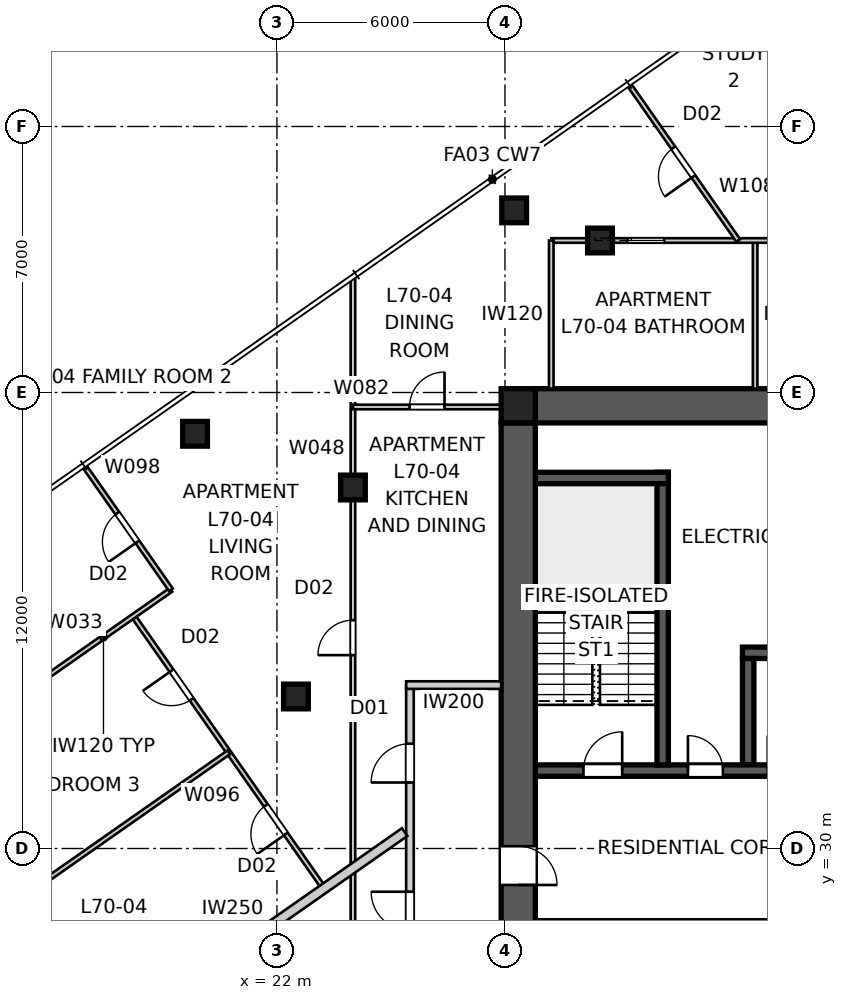
"""IFC4 building model, lengths in metres.
Left out: names, types, materials, properties, quantities, classifications, styles, units other than length and angle.
Written with IfcOpenShell. Run it as: python <this file> out.ifc"""

import sys

from ifc_helpers import new_model, si_unit, direction, frame, frame_2d, origin, origin_2d, place, context, subcontext, project, spatial, polyline, rectangle, outline, extrude, element, fill, save


model = new_model("IFC4")
c1 = context("Model", 3, precision=1e-05, world=origin(), true_north=direction((0.0, 1.0)))
c2 = subcontext(c1, "Body", "Model", "MODEL_VIEW")
j1 = project(units=[si_unit("LENGTHUNIT", "METRE"), si_unit("PLANEANGLEUNIT", "RADIAN")], contexts=[c1])
p1 = place(None, origin())
s1 = spatial("IfcSite", under=j1, at=p1, CompositionType="ELEMENT")
p2 = place(p1, origin())
s2 = spatial("IfcBuilding", under=s1, at=p2, CompositionType="ELEMENT")
p3 = place(p2, frame((0.0, 0.0, 254.0)))
s3 = spatial("IfcBuildingStorey", under=s2, at=p3, CompositionType="ELEMENT", Elevation=254.0)
p4 = place(p3, frame((28.8, 41.65, 0.0), z_axis=(0.0, 0.0, 1.0), x_axis=(1.0, 0.0, 0.0)))
e1 = element("IfcWall", 1, at=p4, inside=s3, PredefinedType="SHEAR", context=c2, shape_type="SweptSolid", body=[
    extrude(outline(polyline([(0.0, -0.45), (22.4, -0.45), (22.4, -0.025), (22.85, -0.025), (22.85, 0.025), (22.4, 0.025), (22.4, 0.45), (0.0, 0.45), (0.0, 0.025), (-0.45, 0.025), (-0.45, -0.025), (0.0, -0.025), (0.0, -0.45)])), origin(), (0.0, 0.0, 1.0), 3.4),
])
p5 = place(p3, frame((28.35, 41.2, 0.0), z_axis=(0.0, 0.0, 1.0), x_axis=(0.0, -1.0, 0.0)))
e2 = element("IfcWall", 2, at=p5, inside=s3, PredefinedType="SHEAR", context=c2, shape_type="SweptSolid", body=[
    extrude(outline(polyline([(0.0, -0.45), (22.4, -0.45), (22.4, -0.025), (22.85, -0.025), (22.85, 0.025), (22.4, 0.025), (22.4, 0.45), (0.0, 0.45), (0.0, 0.025), (-0.45, 0.025), (-0.45, -0.025), (0.0, -0.025), (0.0, -0.45)])), origin(), (0.0, 0.0, 1.0), 3.4),
])
p6 = place(p5, frame((11.14, 0.0, 0.0)))
e3 = element("IfcOpeningElement", 3, at=p6, cuts=e2, PredefinedType="OPENING", context=c2, shape_type="SweptSolid", body=[
    extrude(rectangle(XDim=1.02, YDim=2.4, at=frame_2d((0.51, 1.2))), frame((0.0, 0.46, 0.0), z_axis=(0.0, -1.0, 0.0), x_axis=(1.0, 0.0, 0.0)), (0.0, 0.0, 1.0), 0.92),
])
p7 = place(p3, frame((28.8, 32.05, 0.0), z_axis=(0.0, 0.0, 1.0), x_axis=(1.0, 0.0, 0.0)))
e4 = element("IfcWall", 4, at=p7, inside=s3, PredefinedType="SHEAR", context=c2, shape_type="SweptSolid", body=[
    extrude(rectangle(XDim=22.4, YDim=0.3, at=frame_2d((11.2, 0.0))), origin(), (0.0, 0.0, 1.0), 3.4),
])
p8 = place(p7, frame((19.04, 0.0, 0.0)))
e5 = element("IfcOpeningElement", 5, at=p8, cuts=e4, PredefinedType="OPENING", context=c2, shape_type="SweptSolid", body=[
    extrude(rectangle(XDim=0.92, YDim=2.1, at=frame_2d((0.46, 1.05))), frame((0.0, 0.16, 0.0), z_axis=(0.0, -1.0, 0.0), x_axis=(1.0, 0.0, 0.0)), (0.0, 0.0, 1.0), 0.32),
])
p9 = place(p7, frame((1.265, 0.0, 0.0)))
e6 = element("IfcOpeningElement", 6, at=p9, cuts=e4, PredefinedType="OPENING", context=c2, shape_type="SweptSolid", body=[
    extrude(rectangle(XDim=1.02, YDim=2.1, at=frame_2d((0.51, 1.05))), frame((0.0, 0.16, 0.0), z_axis=(0.0, -1.0, 0.0), x_axis=(1.0, 0.0, 0.0)), (0.0, 0.0, 1.0), 0.32),
])
p10 = place(p7, frame((4.015, 0.0, 0.0)))
e7 = element("IfcOpeningElement", 7, at=p10, cuts=e4, PredefinedType="OPENING", context=c2, shape_type="SweptSolid", body=[
    extrude(rectangle(XDim=0.92, YDim=2.1, at=frame_2d((0.46, 1.05))), frame((0.0, 0.16, 0.0), z_axis=(0.0, -1.0, 0.0), x_axis=(1.0, 0.0, 0.0)), (0.0, 0.0, 1.0), 0.32),
])
p11 = place(p7, frame((6.115, 0.0, 0.0)))
e8 = element("IfcOpeningElement", 8, at=p11, cuts=e4, PredefinedType="OPENING", context=c2, shape_type="SweptSolid", body=[
    extrude(rectangle(XDim=0.92, YDim=2.1, at=frame_2d((0.46, 1.05))), frame((0.0, 0.16, 0.0), z_axis=(0.0, -1.0, 0.0), x_axis=(1.0, 0.0, 0.0)), (0.0, 0.0, 1.0), 0.32),
])
p12 = place(p7, frame((9.79, 0.0, 0.0)))
e9 = element("IfcOpeningElement", 9, at=p12, cuts=e4, PredefinedType="OPENING", context=c2, shape_type="SweptSolid", body=[
    extrude(rectangle(XDim=0.92, YDim=2.1, at=frame_2d((0.46, 1.05))), frame((0.0, 0.16, 0.0), z_axis=(0.0, -1.0, 0.0), x_axis=(1.0, 0.0, 0.0)), (0.0, 0.0, 1.0), 0.32),
])
p13 = place(p7, frame((12.05, 0.0, 0.0)))
e10 = element("IfcOpeningElement", 10, at=p13, cuts=e4, PredefinedType="OPENING", context=c2, shape_type="SweptSolid", body=[
    extrude(rectangle(XDim=1.1, YDim=2.1, at=frame_2d((0.55, 1.05))), frame((0.0, 0.16, 0.0), z_axis=(0.0, -1.0, 0.0), x_axis=(1.0, 0.0, 0.0)), (0.0, 0.0, 1.0), 0.32),
])
p14 = place(p7, frame((14.85, 0.0, 0.0)))
e11 = element("IfcOpeningElement", 11, at=p14, cuts=e4, PredefinedType="OPENING", context=c2, shape_type="SweptSolid", body=[
    extrude(rectangle(XDim=1.1, YDim=2.1, at=frame_2d((0.55, 1.05))), frame((0.0, 0.16, 0.0), z_axis=(0.0, -1.0, 0.0), x_axis=(1.0, 0.0, 0.0)), (0.0, 0.0, 1.0), 0.32),
])
p15 = place(p3, frame((34.25, 35.15, 0.0), z_axis=(0.0, 0.0, 1.0), x_axis=(1.0, 0.0, 0.0)))
e12 = element("IfcWall", 12, at=p15, inside=s3, PredefinedType="SHEAR", context=c2, shape_type="SweptSolid", body=[
    extrude(rectangle(XDim=11.5, YDim=0.3, at=frame_2d((5.75, 0.0))), origin(), (0.0, 0.0, 1.0), 3.4),
])
p16 = place(p3, frame((34.4, 32.2, 0.0), z_axis=(0.0, 0.0, 1.0), x_axis=(0.0, 1.0, 0.0)))
e13 = element("IfcWall", 13, at=p16, inside=s3, PredefinedType="SHEAR", context=c2, shape_type="SweptSolid", body=[
    extrude(rectangle(XDim=2.8, YDim=0.3, at=frame_2d((1.4, 0.0))), origin(), (0.0, 0.0, 1.0), 3.4),
])
p17 = place(p3, frame((32.15, 32.2, 0.0), z_axis=(0.0, 0.0, 1.0), x_axis=(0.0, 1.0, 0.0)))
e14 = element("IfcWall", 14, at=p17, inside=s3, PredefinedType="SHEAR", context=c2, shape_type="SweptSolid", body=[
    extrude(rectangle(XDim=7.7, YDim=0.3, at=frame_2d((3.85, 0.0))), origin(), (0.0, 0.0, 1.0), 3.4),
])
p18 = place(p3, frame((28.8, 39.75, 0.0), z_axis=(0.0, 0.0, 1.0), x_axis=(1.0, 0.0, 0.0)))
e15 = element("IfcWall", 15, at=p18, inside=s3, PredefinedType="SHEAR", context=c2, shape_type="SweptSolid", body=[
    extrude(rectangle(XDim=3.5, YDim=0.3, at=frame_2d((1.75, 0.0))), origin(), (0.0, 0.0, 1.0), 3.4),
])
p19 = place(p3, frame((28.35, 41.65, 0.0), z_axis=(0.0, 0.0, 1.0), x_axis=(1.0, 0.0, 0.0)))
e16 = element("IfcColumn", 16, at=p19, inside=s3, PredefinedType="COLUMN", context=c2, shape_type="SweptSolid", body=[
    extrude(rectangle(XDim=0.9, YDim=0.9, at=origin_2d()), origin(), (0.0, 0.0, 1.0), 3.4),
])
for number, where, z_axis, x_axis in (
    (17, (28.242, 46.793, 0.0), (0.0, 0.0, 1.0), (1.0, 0.0, 0.0)),
    (18, (19.845, 40.914, 0.0), (0.0, 0.0, 1.0), (1.0, 0.0, 0.0)),
    (19, (30.5, 46.0, 0.0), (0.0, 0.0, 1.0), (1.0, 0.0, 0.0)),
    (20, (24.0, 39.5, 0.0), (0.0, 0.0, 1.0), (1.0, 0.0, 0.0)),
    (21, (22.5, 34.0, 0.0), (0.0, 0.0, 1.0), (1.0, 0.0, 0.0)),
):
    element("IfcColumn", number, at=place(p3, frame(where, z_axis=z_axis, x_axis=x_axis)), inside=s3, PredefinedType="COLUMN", context=c2, shape_type="SweptSolid", body=[
        extrude(rectangle(XDim=0.65, YDim=0.65, at=origin_2d()), origin(), (0.0, 0.0, 1.0), 3.4),
    ])
p20 = place(p3, frame((25.5, 25.7, 0.0), z_axis=(0.0, 0.0, 1.0), x_axis=(0.0, 1.0, 0.0)))
e22 = element("IfcWall", 22, at=p20, inside=s3, PredefinedType="PARTITIONING", context=c2, shape_type="SweptSolid", body=[
    extrude(rectangle(XDim=8.6, YDim=0.2, at=frame_2d((4.3, 0.0))), origin(), (0.0, 0.0, 1.0), 3.25),
])
p21 = place(p20, frame((2.142, 0.0, 0.0)))
e23 = element("IfcOpeningElement", 23, at=p21, cuts=e22, PredefinedType="OPENING", context=c2, shape_type="SweptSolid", body=[
    extrude(rectangle(XDim=1.02, YDim=2.34, at=frame_2d((0.51, 1.17))), frame((0.0, 0.11, 0.0), z_axis=(0.0, -1.0, 0.0), x_axis=(1.0, 0.0, 0.0)), (0.0, 0.0, 1.0), 0.22),
])
p22 = place(p20, frame((6.037, 0.0, 0.0)))
e24 = element("IfcOpeningElement", 24, at=p22, cuts=e22, PredefinedType="OPENING", context=c2, shape_type="SweptSolid", body=[
    extrude(rectangle(XDim=1.02, YDim=2.34, at=frame_2d((0.51, 1.17))), frame((0.0, 0.11, 0.0), z_axis=(0.0, -1.0, 0.0), x_axis=(1.0, 0.0, 0.0)), (0.0, 0.0, 1.0), 0.22),
])
p23 = place(p3, frame((27.9, 34.3, 0.0), z_axis=(0.0, 0.0, 1.0), x_axis=(-1.0, 0.0, 0.0)))
e25 = element("IfcWall", 25, at=p23, inside=s3, PredefinedType="PARTITIONING", context=c2, shape_type="SweptSolid", body=[
    extrude(rectangle(XDim=2.5, YDim=0.2, at=frame_2d((1.25, 0.0))), origin(), (0.0, 0.0, 1.0), 3.25),
])
p24 = place(p3, frame((17.369, 24.836, 0.0), z_axis=(0.0, 0.0, 1.0), x_axis=(0.81915902312, 0.573566469418, 0.0)))
e26 = element("IfcWall", 26, at=p24, inside=s3, PredefinedType="PARTITIONING", context=c2, shape_type="SweptSolid", body=[
    extrude(rectangle(XDim=9.756, YDim=0.25, at=frame_2d((4.878, 0.0))), origin(), (0.0, 0.0, 1.0), 3.25),
])
p25 = place(p3, frame((24.0, 18.797, 0.0), z_axis=(0.0, 0.0, 1.0), x_axis=(0.0, 1.0, 0.0)))
e27 = element("IfcWall", 27, at=p25, inside=s3, PredefinedType="PARTITIONING", context=c2, shape_type="SweptSolid", body=[
    extrude(rectangle(XDim=26.198, YDim=0.12, at=frame_2d((13.099, 0.0))), origin(), (0.0, 0.0, 1.0), 2.549),
])
p26 = place(p25, frame((8.016, 0.0, 0.0)))
e28 = element("IfcOpeningElement", 28, at=p26, cuts=e27, PredefinedType="OPENING", context=c2, shape_type="SweptSolid", body=[
    extrude(rectangle(XDim=0.92, YDim=2.34, at=frame_2d((0.46, 1.17))), frame((0.0, 0.07, 0.0), z_axis=(0.0, -1.0, 0.0), x_axis=(1.0, 0.0, 0.0)), (0.0, 0.0, 1.0), 0.14),
])
p27 = place(p25, frame((16.292, 0.0, 0.0)))
e29 = element("IfcOpeningElement", 29, at=p27, cuts=e27, PredefinedType="OPENING", context=c2, shape_type="SweptSolid", body=[
    extrude(rectangle(XDim=0.92, YDim=2.34, at=frame_2d((0.46, 1.17))), frame((0.0, 0.07, 0.0), z_axis=(0.0, -1.0, 0.0), x_axis=(1.0, 0.0, 0.0)), (0.0, 0.0, 1.0), 0.14),
])
p28 = place(p3, frame((24.0, 41.619, 0.0), z_axis=(0.0, 0.0, 1.0), x_axis=(1.0, 0.0, 0.0)))
e30 = element("IfcWall", 30, at=p28, inside=s3, PredefinedType="PARTITIONING", context=c2, shape_type="SweptSolid", body=[
    extrude(rectangle(XDim=3.9, YDim=0.12, at=frame_2d((1.95, 0.0))), origin(), (0.0, 0.0, 1.0), 3.25),
])
p29 = place(p28, frame((1.49, 0.0, 0.0)))
e31 = element("IfcOpeningElement", 31, at=p29, cuts=e30, PredefinedType="OPENING", context=c2, shape_type="SweptSolid", body=[
    extrude(rectangle(XDim=0.92, YDim=2.1, at=frame_2d((0.46, 1.05))), frame((0.0, 0.07, 0.0), z_axis=(0.0, -1.0, 0.0), x_axis=(1.0, 0.0, 0.0)), (0.0, 0.0, 1.0), 0.14),
])
p30 = place(p3, frame((34.583, 46.0, 0.0), z_axis=(0.0, 0.0, 1.0), x_axis=(0.0, -1.0, 0.0)))
e32 = element("IfcWall", 32, at=p30, inside=s3, PredefinedType="PARTITIONING", context=c2, shape_type="SweptSolid", body=[
    extrude(rectangle(XDim=3.9, YDim=0.12, at=frame_2d((1.95, 0.0))), origin(), (0.0, 0.0, 1.0), 3.25),
])
p31 = place(p3, frame((29.219, 46.0, 0.0), z_axis=(0.0, 0.0, 1.0), x_axis=(1.0, 0.0, 0.0)))
e33 = element("IfcWall", 33, at=p31, inside=s3, PredefinedType="PARTITIONING", context=c2, shape_type="SweptSolid", body=[
    extrude(rectangle(XDim=11.034, YDim=0.12, at=frame_2d((5.517, 0.0))), origin(), (0.0, 0.0, 1.0), 2.549),
])
p32 = place(p31, frame((2.01, 0.0, 0.0)))
e34 = element("IfcOpeningElement", 34, at=p32, cuts=e33, PredefinedType="OPENING", context=c2, shape_type="SweptSolid", body=[
    extrude(rectangle(XDim=0.96, YDim=2.1, at=frame_2d((0.48, 1.05))), frame((0.0, 0.07, 0.0), z_axis=(0.0, -1.0, 0.0), x_axis=(1.0, 0.0, 0.0)), (0.0, 0.0, 1.0), 0.14),
])
p33 = place(p31, frame((7.363, 0.0, 0.0)))
e35 = element("IfcOpeningElement", 35, at=p33, cuts=e33, PredefinedType="OPENING", context=c2, shape_type="SweptSolid", body=[
    extrude(rectangle(XDim=0.96, YDim=2.1, at=frame_2d((0.48, 1.05))), frame((0.0, 0.07, 0.0), z_axis=(0.0, -1.0, 0.0), x_axis=(1.0, 0.0, 0.0)), (0.0, 0.0, 1.0), 0.14),
])
p34 = place(p3, frame((29.219, 42.1, 0.0), z_axis=(0.0, 0.0, 1.0), x_axis=(0.0, 1.0, 0.0)))
e36 = element("IfcWall", 36, at=p34, inside=s3, PredefinedType="PARTITIONING", context=c2, shape_type="SweptSolid", body=[
    extrude(rectangle(XDim=3.9, YDim=0.12, at=frame_2d((1.95, 0.0))), origin(), (0.0, 0.0, 1.0), 3.25),
])
p35 = place(p3, frame((23.24, 28.947, 0.0), z_axis=(0.0, 0.0, 1.0), x_axis=(-0.573582185905, 0.819148018378, 0.0)))
e37 = element("IfcWall", 37, at=p35, inside=s3, PredefinedType="PARTITIONING", context=c2, shape_type="SweptSolid", body=[
    extrude(rectangle(XDim=8.75, YDim=0.12, at=frame_2d((4.375, 0.0))), origin(), (0.0, 0.0, 1.0), 3.25),
])
p36 = place(p35, frame((6.078, 0.0, 0.0)))
e38 = element("IfcOpeningElement", 38, at=p36, cuts=e37, PredefinedType="OPENING", context=c2, shape_type="SweptSolid", body=[
    extrude(rectangle(XDim=0.92, YDim=2.34, at=frame_2d((0.46, 1.17))), frame((0.0, 0.07, 0.0), z_axis=(0.0, -1.0, 0.0), x_axis=(1.0, 0.0, 0.0)), (0.0, 0.0, 1.0), 0.14),
])
p37 = place(p35, frame((1.752, 0.0, 0.0)))
e39 = element("IfcOpeningElement", 39, at=p37, cuts=e37, PredefinedType="OPENING", context=c2, shape_type="SweptSolid", body=[
    extrude(rectangle(XDim=0.92, YDim=2.34, at=frame_2d((0.46, 1.17))), frame((0.0, 0.07, 0.0), z_axis=(0.0, -1.0, 0.0), x_axis=(1.0, 0.0, 0.0)), (0.0, 0.0, 1.0), 0.14),
])
p38 = place(p3, frame((15.66, 34.321, 0.0), z_axis=(0.0, 0.0, 1.0), x_axis=(0.819139307094, 0.573594626521, 0.0)))
e40 = element("IfcWall", 40, at=p38, inside=s3, PredefinedType="PARTITIONING", context=c2, shape_type="SweptSolid", body=[
    extrude(rectangle(XDim=4.335, YDim=0.12, at=frame_2d((2.167, 0.0))), origin(), (0.0, 0.0, 1.0), 3.25),
])
p39 = place(p3, frame((19.211, 36.807, 0.0), z_axis=(0.0, 0.0, 1.0), x_axis=(-0.573578200724, 0.819150808859, 0.0)))
e41 = element("IfcWall", 41, at=p39, inside=s3, PredefinedType="PARTITIONING", context=c2, shape_type="SweptSolid", body=[
    extrude(rectangle(XDim=3.96, YDim=0.12, at=frame_2d((1.98, 0.0))), origin(), (0.0, 0.0, 1.0), 3.25),
])
p40 = place(p39, frame((1.54, 0.0, 0.0)))
e42 = element("IfcOpeningElement", 42, at=p40, cuts=e41, PredefinedType="OPENING", context=c2, shape_type="SweptSolid", body=[
    extrude(rectangle(XDim=0.92, YDim=2.34, at=frame_2d((0.46, 1.17))), frame((0.0, 0.07, 0.0), z_axis=(0.0, -1.0, 0.0), x_axis=(1.0, 0.0, 0.0)), (0.0, 0.0, 1.0), 0.14),
])
p41 = place(p3, frame((20.731, 32.53, 0.0), z_axis=(0.0, 0.0, 1.0), x_axis=(-0.819153056029, -0.573574991434, 0.0)))
e43 = element("IfcWall", 43, at=p41, inside=s3, PredefinedType="PARTITIONING", context=c2, shape_type="SweptSolid", body=[
    extrude(rectangle(XDim=7.127, YDim=0.12, at=frame_2d((3.563, 0.0))), origin(), (0.0, 0.0, 1.0), 3.25),
])
p42 = place(p3, frame((34.859, 52.598, 0.0), z_axis=(0.0, 0.0, 1.0), x_axis=(0.573586984922, -0.819144657999, 0.0)))
e44 = element("IfcWall", 44, at=p42, inside=s3, PredefinedType="PARTITIONING", context=c2, shape_type="SweptSolid", body=[
    extrude(rectangle(XDim=4.864, YDim=0.12, at=frame_2d((2.432, 0.0))), origin(), (0.0, 0.0, 1.0), 3.25),
])
p43 = place(p42, frame((1.952, 0.0, 0.0)))
e45 = element("IfcOpeningElement", 45, at=p43, cuts=e44, PredefinedType="OPENING", context=c2, shape_type="SweptSolid", body=[
    extrude(rectangle(XDim=0.92, YDim=2.34, at=frame_2d((0.46, 1.17))), frame((0.0, 0.07, 0.0), z_axis=(0.0, -1.0, 0.0), x_axis=(1.0, 0.0, 0.0)), (0.0, 0.0, 1.0), 0.14),
])
p44 = place(p3, frame((34.138, 46.0, 0.0), z_axis=(0.0, 0.0, 1.0), x_axis=(-0.57358708951, 0.819144584763, 0.0)))
e46 = element("IfcWall", 46, at=p44, inside=s3, PredefinedType="PARTITIONING", context=c2, shape_type="SweptSolid", body=[
    extrude(rectangle(XDim=4.991, YDim=0.12, at=frame_2d((2.496, 0.0))), origin(), (0.0, 0.0, 1.0), 3.25),
])
p45 = place(p44, frame((2.055, 0.0, 0.0)))
e47 = element("IfcOpeningElement", 47, at=p45, cuts=e46, PredefinedType="OPENING", context=c2, shape_type="SweptSolid", body=[
    extrude(rectangle(XDim=0.92, YDim=2.34, at=frame_2d((0.46, 1.17))), frame((0.0, 0.07, 0.0), z_axis=(0.0, -1.0, 0.0), x_axis=(1.0, 0.0, 0.0)), (0.0, 0.0, 1.0), 0.14),
])
p46 = place(p3, frame((27.9, 41.619, 0.0), z_axis=(0.0, 0.0, 1.0), x_axis=(0.999397924003, 0.034695669724, 0.0)))
e48 = element("IfcWall", 48, at=p46, inside=s3, PredefinedType="PARTITIONING", context=c2, shape_type="SweptSolid", body=[
    extrude(rectangle(XDim=0.901, YDim=0.12, at=frame_2d((0.45, 0.0))), origin(), (0.0, 0.0, 1.0), 3.25),
])
p47 = place(p9, origin())
e49 = element("IfcDoor", 49, at=p47, inside=s3, OperationType="SINGLE_SWING_RIGHT", PredefinedType="DOOR", context=c2, shape_type="SweptSolid", body=[
    extrude(rectangle(XDim=1.02, YDim=2.1, at=frame_2d((0.51, 1.05))), frame((0.0, 0.025, 0.0), z_axis=(0.0, -1.0, 0.0), x_axis=(1.0, 0.0, 0.0)), (0.0, 0.0, 1.0), 0.05),
])
fill(e6, e49)
p48 = place(p10, origin())
e50 = element("IfcDoor", 50, at=p48, inside=s3, OperationType="SINGLE_SWING_LEFT", PredefinedType="DOOR", context=c2, shape_type="SweptSolid", body=[
    extrude(rectangle(XDim=0.92, YDim=2.1, at=frame_2d((0.46, 1.05))), frame((0.0, 0.025, 0.0), z_axis=(0.0, -1.0, 0.0), x_axis=(1.0, 0.0, 0.0)), (0.0, 0.0, 1.0), 0.05),
])
fill(e7, e50)
p49 = place(p21, origin())
e51 = element("IfcDoor", 51, at=p49, inside=s3, OperationType="SINGLE_SWING_RIGHT", PredefinedType="DOOR", context=c2, shape_type="SweptSolid", body=[
    extrude(rectangle(XDim=1.02, YDim=2.34, at=frame_2d((0.51, 1.17))), frame((0.0, 0.025, 0.0), z_axis=(0.0, -1.0, 0.0), x_axis=(1.0, 0.0, 0.0)), (0.0, 0.0, 1.0), 0.05),
])
fill(e23, e51)
p50 = place(p22, origin())
e52 = element("IfcDoor", 52, at=p50, inside=s3, OperationType="SINGLE_SWING_LEFT", PredefinedType="DOOR", context=c2, shape_type="SweptSolid", body=[
    extrude(rectangle(XDim=1.02, YDim=2.34, at=frame_2d((0.51, 1.17))), frame((0.0, 0.025, 0.0), z_axis=(0.0, -1.0, 0.0), x_axis=(1.0, 0.0, 0.0)), (0.0, 0.0, 1.0), 0.05),
])
fill(e24, e52)
p51 = place(p27, origin())
e53 = element("IfcDoor", 53, at=p51, inside=s3, OperationType="SINGLE_SWING_LEFT", PredefinedType="DOOR", context=c2, shape_type="SweptSolid", body=[
    extrude(rectangle(XDim=0.92, YDim=2.34, at=frame_2d((0.46, 1.17))), frame((0.0, 0.025, 0.0), z_axis=(0.0, -1.0, 0.0), x_axis=(1.0, 0.0, 0.0)), (0.0, 0.0, 1.0), 0.05),
])
fill(e29, e53)
p52 = place(p29, origin())
e54 = element("IfcDoor", 54, at=p52, inside=s3, OperationType="SINGLE_SWING_RIGHT", PredefinedType="DOOR", context=c2, shape_type="SweptSolid", body=[
    extrude(rectangle(XDim=0.92, YDim=2.1, at=frame_2d((0.46, 1.05))), frame((0.0, 0.025, 0.0), z_axis=(0.0, -1.0, 0.0), x_axis=(1.0, 0.0, 0.0)), (0.0, 0.0, 1.0), 0.05),
])
fill(e31, e54)
p53 = place(p36, origin())
e55 = element("IfcDoor", 55, at=p53, inside=s3, OperationType="SINGLE_SWING_RIGHT", PredefinedType="DOOR", context=c2, shape_type="SweptSolid", body=[
    extrude(rectangle(XDim=0.92, YDim=2.34, at=frame_2d((0.46, 1.17))), frame((0.0, 0.025, 0.0), z_axis=(0.0, -1.0, 0.0), x_axis=(1.0, 0.0, 0.0)), (0.0, 0.0, 1.0), 0.05),
])
fill(e38, e55)
p54 = place(p37, origin())
e56 = element("IfcDoor", 56, at=p54, inside=s3, OperationType="SINGLE_SWING_LEFT", PredefinedType="DOOR", context=c2, shape_type="SweptSolid", body=[
    extrude(rectangle(XDim=0.92, YDim=2.34, at=frame_2d((0.46, 1.17))), frame((0.0, 0.025, 0.0), z_axis=(0.0, -1.0, 0.0), x_axis=(1.0, 0.0, 0.0)), (0.0, 0.0, 1.0), 0.05),
])
fill(e39, e56)
p55 = place(p40, origin())
e57 = element("IfcDoor", 57, at=p55, inside=s3, OperationType="SINGLE_SWING_LEFT", PredefinedType="DOOR", context=c2, shape_type="SweptSolid", body=[
    extrude(rectangle(XDim=0.92, YDim=2.34, at=frame_2d((0.46, 1.17))), frame((0.0, 0.025, 0.0), z_axis=(0.0, -1.0, 0.0), x_axis=(1.0, 0.0, 0.0)), (0.0, 0.0, 1.0), 0.05),
])
fill(e42, e57)
p56 = place(p45, origin())
e58 = element("IfcDoor", 58, at=p56, inside=s3, OperationType="SINGLE_SWING_LEFT", PredefinedType="DOOR", context=c2, shape_type="SweptSolid", body=[
    extrude(rectangle(XDim=0.92, YDim=2.34, at=frame_2d((0.46, 1.17))), frame((0.0, 0.025, 0.0), z_axis=(0.0, -1.0, 0.0), x_axis=(1.0, 0.0, 0.0)), (0.0, 0.0, 1.0), 0.05),
])
fill(e47, e58)
p57 = place(p32, origin())
e59 = element("IfcDoor", 59, at=p57, inside=s3, OperationType="SLIDING_TO_LEFT", PredefinedType="DOOR", context=c2, shape_type="SweptSolid", body=[
    extrude(rectangle(XDim=0.96, YDim=2.1, at=frame_2d((0.48, 1.05))), frame((0.0, 0.025, 0.0), z_axis=(0.0, -1.0, 0.0), x_axis=(1.0, 0.0, 0.0)), (0.0, 0.0, 1.0), 0.05),
])
fill(e34, e59)
p58 = place(p6, origin())
e60 = element("IfcDoor", 60, at=p58, inside=s3, OperationType="SINGLE_SWING_RIGHT", PredefinedType="DOOR", context=c2, shape_type="SweptSolid", body=[
    extrude(rectangle(XDim=1.02, YDim=2.4, at=frame_2d((0.51, 1.2))), frame((0.0, 0.025, 0.0), z_axis=(0.0, -1.0, 0.0), x_axis=(1.0, 0.0, 0.0)), (0.0, 0.0, 1.0), 0.05),
])
fill(e3, e60)
save(model, sys.argv[1])
